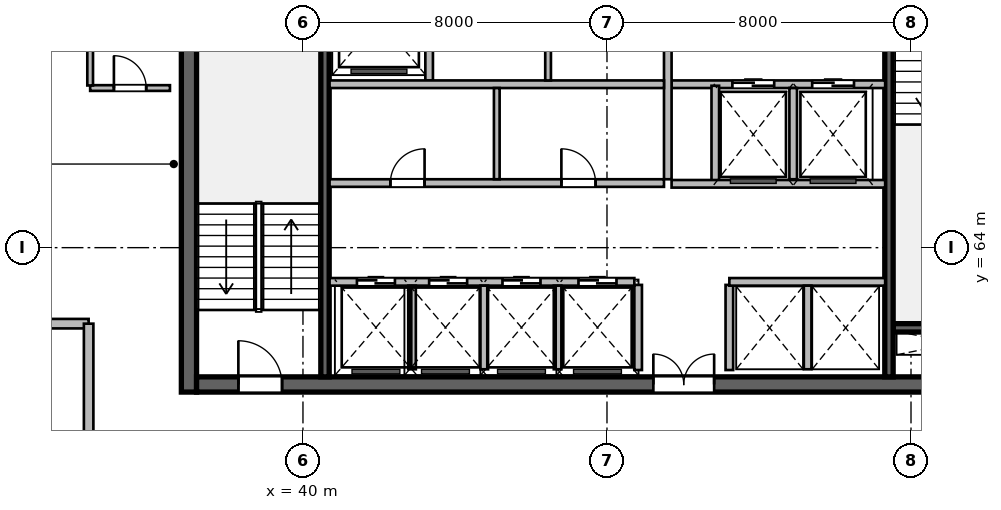
"""IFC4 building model, lengths in metres.
Left out: names, types, materials, properties, quantities, classifications, styles, units other than length and angle.
Written with IfcOpenShell. Run it as: python <this file> out.ifc"""

import sys

from ifc_helpers import new_model, si_unit, direction, frame, frame_2d, origin, place, context, subcontext, project, spatial, rectangle, extrude, source, transform, mapped, element, fill, save


model = new_model("IFC4")
c1 = context("Model", 3, precision=1e-05, world=origin(), true_north=direction((0.0, 1.0)))
c2 = subcontext(c1, "Body", "Model", "MODEL_VIEW")
j1 = project(units=[si_unit("LENGTHUNIT", "METRE"), si_unit("PLANEANGLEUNIT", "RADIAN")], contexts=[c1])
p1 = place(None, origin())
s1 = spatial("IfcSite", under=j1, at=p1, CompositionType="ELEMENT")
p2 = place(p1, origin())
s2 = spatial("IfcBuilding", under=s1, at=p2, CompositionType="ELEMENT")
p3 = place(p2, frame((0.0, 0.0, 264.0)))
s3 = spatial("IfcBuildingStorey", under=s2, at=p3, CompositionType="ELEMENT", Elevation=264.0)
m1 = source(origin(), c2, "Body", "SweptSolid", [
    extrude(rectangle(XDim=12.0, YDim=0.4, at=frame_2d((6.0, 0.0))), origin(), (0.0, 0.0, 1.0), 3.9),
])
p4 = place(p3, frame((37.0, 60.2, 0.0), z_axis=(0.0, 0.0, 1.0), x_axis=(0.0, 1.0, 0.0)))
e1 = element("IfcWall", 1, at=p4, inside=s3, PredefinedType="SHEAR", context=c2, shape_type="MappedRepresentation", body=[
    mapped(m1, transform((0.0, 0.0, 0.0), scale=1.0)),
])
m2 = source(origin(), c2, "Body", "SweptSolid", [
    extrude(rectangle(XDim=21.6, YDim=0.4, at=frame_2d((10.8, 0.0))), origin(), (0.0, 0.0, 1.0), 3.9),
])
p5 = place(p3, frame((37.2, 60.4, 0.0), z_axis=(0.0, 0.0, 1.0), x_axis=(1.0, 0.0, 0.0)))
e2 = element("IfcWall", 2, at=p5, inside=s3, PredefinedType="SHEAR", context=c2, shape_type="MappedRepresentation", body=[
    mapped(m2, transform((0.0, 0.0, 0.0), scale=1.0)),
])
p6 = place(p5, frame((1.1, 0.0, 0.0)))
e3 = element("IfcOpeningElement", 3, at=p6, cuts=e2, PredefinedType="OPENING", context=c2, shape_type="SweptSolid", body=[
    extrude(rectangle(XDim=1.15, YDim=2.15, at=frame_2d((0.575, 1.075))), frame((0.0, 0.21, 0.0), z_axis=(0.0, -1.0, 0.0), x_axis=(1.0, 0.0, 0.0)), (0.0, 0.0, 1.0), 0.42),
])
p7 = place(p5, frame((19.5, 0.0, 0.0)))
e4 = element("IfcOpeningElement", 4, at=p7, cuts=e2, PredefinedType="OPENING", context=c2, shape_type="SweptSolid", body=[
    extrude(rectangle(XDim=0.9, YDim=2.1, at=frame_2d((0.45, 1.05))), frame((0.0, 0.21, 0.0), z_axis=(0.0, -1.0, 0.0), x_axis=(1.0, 0.0, 0.0)), (0.0, 0.0, 1.0), 0.42),
])
p8 = place(p5, frame((12.02, 0.0, 0.0)))
e5 = element("IfcOpeningElement", 5, at=p8, cuts=e2, PredefinedType="OPENING", context=c2, shape_type="SweptSolid", body=[
    extrude(rectangle(XDim=1.6, YDim=2.15, at=frame_2d((0.8, 1.075))), frame((0.0, 0.21, 0.0), z_axis=(0.0, -1.0, 0.0), x_axis=(1.0, 0.0, 0.0)), (0.0, 0.0, 1.0), 0.42),
])
m3 = source(origin(), c2, "Body", "SweptSolid", [
    extrude(rectangle(XDim=3.27, YDim=0.22, at=frame_2d((1.635, 0.0))), origin(), (0.0, 0.0, 1.0), 3.9),
])
p9 = place(p3, frame((55.53, 61.89, 0.0), z_axis=(0.0, 0.0, 1.0), x_axis=(1.0, 0.0, 0.0)))
e6 = element("IfcWall", 6, at=p9, inside=s3, PredefinedType="SHEAR", context=c2, shape_type="MappedRepresentation", body=[
    mapped(m3, transform((0.0, 0.0, 0.0), scale=1.0)),
])
m4 = source(origin(), c2, "Body", "SweptSolid", [
    extrude(rectangle(XDim=11.2, YDim=0.22, at=frame_2d((5.6, 0.0))), origin(), (0.0, 0.0, 1.0), 3.9),
])
p10 = place(p3, frame((40.58, 60.6, 0.0), z_axis=(0.0, 0.0, 1.0), x_axis=(0.0, 1.0, 0.0)))
e7 = element("IfcWall", 7, at=p10, inside=s3, PredefinedType="SHEAR", context=c2, shape_type="MappedRepresentation", body=[
    mapped(m4, transform((0.0, 0.0, 0.0), scale=1.0)),
])
p11 = place(p3, frame((55.42, 60.6, 0.0), z_axis=(0.0, 0.0, 1.0), x_axis=(0.0, 1.0, 0.0)))
e8 = element("IfcWall", 8, at=p11, inside=s3, PredefinedType="SHEAR", context=c2, shape_type="MappedRepresentation", body=[
    mapped(m4, transform((0.0, 0.0, 0.0), scale=1.0)),
])
p12 = place(p11, frame((9.645, 0.0, 0.0)))
e9 = element("IfcOpeningElement", 9, at=p12, cuts=e8, PredefinedType="OPENING", context=c2, shape_type="SweptSolid", body=[
    extrude(rectangle(XDim=1.15, YDim=2.15, at=frame_2d((0.575, 1.075))), frame((0.0, 0.12, 0.0), z_axis=(0.0, -1.0, 0.0), x_axis=(1.0, 0.0, 0.0)), (0.0, 0.0, 1.0), 0.24),
])
m5 = source(origin(), c2, "Body", "SweptSolid", [
    extrude(rectangle(XDim=2.24, YDim=0.2, at=frame_2d((1.12, 0.0))), origin(), (0.0, 0.0, 1.0), 3.65),
])
for number, where, z_axis, x_axis in (
    (10, (48.82, 60.78, 0.0), (0.0, 0.0, 1.0), (0.0, 1.0, 0.0)),
    (11, (51.22, 60.78, 0.0), (0.0, 0.0, 1.0), (0.0, 1.0, 0.0)),
):
    element("IfcWall", number, at=place(p3, frame(where, z_axis=z_axis, x_axis=x_axis)), inside=s3, PredefinedType="SOLIDWALL", context=c2, shape_type="MappedRepresentation", body=[
        mapped(m5, transform((0.0, 0.0, 0.0), scale=1.0)),
    ])
m6 = source(origin(), c2, "Body", "SweptSolid", [
    extrude(rectangle(XDim=5.62, YDim=0.2, at=frame_2d((2.81, 0.0))), origin(), (0.0, 0.0, 1.0), 3.65),
])
p13 = place(p3, frame((49.7, 68.3, 0.0), z_axis=(0.0, 0.0, 1.0), x_axis=(1.0, 0.0, 0.0)))
e12 = element("IfcWall", 12, at=p13, inside=s3, PredefinedType="SOLIDWALL", context=c2, shape_type="MappedRepresentation", body=[
    mapped(m6, transform((0.0, 0.0, 0.0), scale=1.0)),
])
p14 = place(p13, frame((1.6, 0.0, 0.0)))
e13 = element("IfcOpeningElement", 13, at=p14, cuts=e12, PredefinedType="OPENING", context=c2, shape_type="SweptSolid", body=[
    extrude(rectangle(XDim=1.1, YDim=2.15, at=frame_2d((0.55, 1.075))), frame((0.0, 0.11, 0.0), z_axis=(0.0, -1.0, 0.0), x_axis=(1.0, 0.0, 0.0)), (0.0, 0.0, 1.0), 0.22),
])
p15 = place(p13, frame((3.7, 0.0, 0.0)))
e14 = element("IfcOpeningElement", 14, at=p15, cuts=e12, PredefinedType="OPENING", context=c2, shape_type="SweptSolid", body=[
    extrude(rectangle(XDim=1.1, YDim=2.15, at=frame_2d((0.55, 1.075))), frame((0.0, 0.11, 0.0), z_axis=(0.0, -1.0, 0.0), x_axis=(1.0, 0.0, 0.0)), (0.0, 0.0, 1.0), 0.22),
])
m7 = source(origin(), c2, "Body", "SweptSolid", [
    extrude(rectangle(XDim=5.8, YDim=0.2, at=frame_2d((2.9, 0.0))), origin(), (0.0, 0.0, 1.0), 3.65),
])
p16 = place(p3, frame((49.6, 65.8, 0.0), z_axis=(0.0, 0.0, 1.0), x_axis=(0.0, 1.0, 0.0)))
e15 = element("IfcWall", 15, at=p16, inside=s3, PredefinedType="SOLIDWALL", context=c2, shape_type="MappedRepresentation", body=[
    mapped(m7, transform((0.0, 0.0, 0.0), scale=1.0)),
])
m8 = source(origin(), c2, "Body", "SweptSolid", [
    extrude(rectangle(XDim=2.58, YDim=0.2, at=frame_2d((1.29, 0.0))), origin(), (0.0, 0.0, 1.0), 3.65),
])
p17 = place(p3, frame((50.85, 65.68, 0.0), z_axis=(0.0, 0.0, 1.0), x_axis=(0.0, 1.0, 0.0)))
e16 = element("IfcWall", 16, at=p17, inside=s3, PredefinedType="SOLIDWALL", context=c2, shape_type="MappedRepresentation", body=[
    mapped(m8, transform((0.0, 0.0, 0.0), scale=1.0)),
])
m9 = source(origin(), c2, "Body", "SweptSolid", [
    extrude(rectangle(XDim=2.4, YDim=0.2, at=frame_2d((1.2, 0.0))), origin(), (0.0, 0.0, 1.0), 3.65),
])
p18 = place(p3, frame((52.9, 65.8, 0.0), z_axis=(0.0, 0.0, 1.0), x_axis=(0.0, 1.0, 0.0)))
e17 = element("IfcWall", 17, at=p18, inside=s3, PredefinedType="SOLIDWALL", context=c2, shape_type="MappedRepresentation", body=[
    mapped(m9, transform((0.0, 0.0, 0.0), scale=1.0)),
])
p19 = place(p3, frame((49.7, 65.68, 0.0), z_axis=(0.0, 0.0, 1.0), x_axis=(1.0, 0.0, 0.0)))
e18 = element("IfcWall", 18, at=p19, inside=s3, PredefinedType="SOLIDWALL", context=c2, shape_type="MappedRepresentation", body=[
    mapped(m6, transform((0.0, 0.0, 0.0), scale=1.0)),
])
m10 = source(origin(), c2, "Body", "SweptSolid", [
    extrude(rectangle(XDim=3.2, YDim=0.2, at=frame_2d((1.6, 0.0))), origin(), (0.0, 0.0, 1.0), 3.65),
])
p20 = place(p3, frame((43.32, 68.4, 0.0), z_axis=(0.0, 0.0, 1.0), x_axis=(0.0, 1.0, 0.0)))
e19 = element("IfcWall", 19, at=p20, inside=s3, PredefinedType="SOLIDWALL", context=c2, shape_type="MappedRepresentation", body=[
    mapped(m10, transform((0.0, 0.0, 0.0), scale=1.0)),
])
m11 = source(origin(), c2, "Body", "SweptSolid", [
    extrude(rectangle(XDim=8.8, YDim=0.2, at=frame_2d((4.4, 0.0))), origin(), (0.0, 0.0, 1.0), 3.65),
])
p21 = place(p3, frame((40.7, 68.3, 0.0), z_axis=(0.0, 0.0, 1.0), x_axis=(1.0, 0.0, 0.0)))
e20 = element("IfcWall", 20, at=p21, inside=s3, PredefinedType="SOLIDWALL", context=c2, shape_type="MappedRepresentation", body=[
    mapped(m11, transform((0.0, 0.0, 0.0), scale=1.0)),
])
m12 = source(origin(), c2, "Body", "SweptSolid", [
    extrude(rectangle(XDim=3.38, YDim=0.15, at=frame_2d((1.69, 0.0))), origin(), (0.0, 0.0, 1.0), 3.65),
])
p22 = place(p3, frame((46.45, 68.4, 0.0), z_axis=(0.0, 0.0, 1.0), x_axis=(0.0, 1.0, 0.0)))
e21 = element("IfcWall", 21, at=p22, inside=s3, PredefinedType="PARTITIONING", context=c2, shape_type="MappedRepresentation", body=[
    mapped(m12, transform((0.0, 0.0, 0.0), scale=1.0)),
])
m13 = source(origin(), c2, "Body", "SweptSolid", [
    extrude(rectangle(XDim=8.02, YDim=0.2, at=frame_2d((4.01, 0.0))), origin(), (0.0, 0.0, 1.0), 3.65),
])
p23 = place(p3, frame((40.7, 63.1, 0.0), z_axis=(0.0, 0.0, 1.0), x_axis=(1.0, 0.0, 0.0)))
e22 = element("IfcWall", 22, at=p23, inside=s3, PredefinedType="SOLIDWALL", context=c2, shape_type="MappedRepresentation", body=[
    mapped(m13, transform((0.0, 0.0, 0.0), scale=1.0)),
])
p24 = place(p23, frame((0.72, 0.0, 0.0)))
e23 = element("IfcOpeningElement", 23, at=p24, cuts=e22, PredefinedType="OPENING", context=c2, shape_type="SweptSolid", body=[
    extrude(rectangle(XDim=1.0, YDim=2.15, at=frame_2d((0.5, 1.075))), frame((0.0, 0.11, 0.0), z_axis=(0.0, -1.0, 0.0), x_axis=(1.0, 0.0, 0.0)), (0.0, 0.0, 1.0), 0.22),
])
p25 = place(p23, frame((2.62, 0.0, 0.0)))
e24 = element("IfcOpeningElement", 24, at=p25, cuts=e22, PredefinedType="OPENING", context=c2, shape_type="SweptSolid", body=[
    extrude(rectangle(XDim=1.0, YDim=2.15, at=frame_2d((0.5, 1.075))), frame((0.0, 0.11, 0.0), z_axis=(0.0, -1.0, 0.0), x_axis=(1.0, 0.0, 0.0)), (0.0, 0.0, 1.0), 0.22),
])
p26 = place(p23, frame((4.55, 0.0, 0.0)))
e25 = element("IfcOpeningElement", 25, at=p26, cuts=e22, PredefinedType="OPENING", context=c2, shape_type="SweptSolid", body=[
    extrude(rectangle(XDim=1.0, YDim=2.15, at=frame_2d((0.5, 1.075))), frame((0.0, 0.11, 0.0), z_axis=(0.0, -1.0, 0.0), x_axis=(1.0, 0.0, 0.0)), (0.0, 0.0, 1.0), 0.22),
])
p27 = place(p23, frame((6.55, 0.0, 0.0)))
e26 = element("IfcOpeningElement", 26, at=p27, cuts=e22, PredefinedType="OPENING", context=c2, shape_type="SweptSolid", body=[
    extrude(rectangle(XDim=1.0, YDim=2.15, at=frame_2d((0.5, 1.075))), frame((0.0, 0.11, 0.0), z_axis=(0.0, -1.0, 0.0), x_axis=(1.0, 0.0, 0.0)), (0.0, 0.0, 1.0), 0.22),
])
m14 = source(origin(), c2, "Body", "SweptSolid", [
    extrude(rectangle(XDim=4.1, YDim=0.2, at=frame_2d((2.05, 0.0))), origin(), (0.0, 0.0, 1.0), 3.65),
])
p28 = place(p3, frame((51.22, 63.1, 0.0), z_axis=(0.0, 0.0, 1.0), x_axis=(1.0, 0.0, 0.0)))
e27 = element("IfcWall", 27, at=p28, inside=s3, PredefinedType="SOLIDWALL", context=c2, shape_type="MappedRepresentation", body=[
    mapped(m14, transform((0.0, 0.0, 0.0), scale=1.0)),
])
m15 = source(origin(), c2, "Body", "SweptSolid", [
    extrude(rectangle(XDim=2.2, YDim=0.2, at=frame_2d((1.1, 0.0))), origin(), (0.0, 0.0, 1.0), 3.65),
])
for number, where, z_axis, x_axis in (
    (28, (42.87, 60.8, 0.0), (0.0, 0.0, 1.0), (0.0, 1.0, 0.0)),
    (29, (44.77, 60.8, 0.0), (0.0, 0.0, 1.0), (0.0, 1.0, 0.0)),
    (30, (46.7, 60.8, 0.0), (0.0, 0.0, 1.0), (0.0, 1.0, 0.0)),
    (31, (53.28, 60.8, 0.0), (0.0, 0.0, 1.0), (0.0, 1.0, 0.0)),
):
    element("IfcWall", number, at=place(p3, frame(where, z_axis=z_axis, x_axis=x_axis)), inside=s3, PredefinedType="SOLIDWALL", context=c2, shape_type="MappedRepresentation", body=[
        mapped(m15, transform((0.0, 0.0, 0.0), scale=1.0)),
    ])
p29 = place(p3, frame((40.7, 65.7, 0.0), z_axis=(0.0, 0.0, 1.0), x_axis=(1.0, 0.0, 0.0)))
e32 = element("IfcWall", 32, at=p29, inside=s3, PredefinedType="SOLIDWALL", context=c2, shape_type="MappedRepresentation", body=[
    mapped(m11, transform((0.0, 0.0, 0.0), scale=1.0)),
])
p30 = place(p29, frame((1.6, 0.0, 0.0)))
e33 = element("IfcOpeningElement", 33, at=p30, cuts=e32, PredefinedType="OPENING", context=c2, shape_type="SweptSolid", body=[
    extrude(rectangle(XDim=0.9, YDim=2.1, at=frame_2d((0.45, 1.05))), frame((0.0, 0.11, 0.0), z_axis=(0.0, -1.0, 0.0), x_axis=(1.0, 0.0, 0.0)), (0.0, 0.0, 1.0), 0.22),
])
p31 = place(p29, frame((6.1, 0.0, 0.0)))
e34 = element("IfcOpeningElement", 34, at=p31, cuts=e32, PredefinedType="OPENING", context=c2, shape_type="SweptSolid", body=[
    extrude(rectangle(XDim=0.9, YDim=2.1, at=frame_2d((0.45, 1.05))), frame((0.0, 0.11, 0.0), z_axis=(0.0, -1.0, 0.0), x_axis=(1.0, 0.0, 0.0)), (0.0, 0.0, 1.0), 0.22),
])
m16 = source(origin(), c2, "Body", "SweptSolid", [
    extrude(rectangle(XDim=2.4, YDim=0.15, at=frame_2d((1.2, 0.0))), origin(), (0.0, 0.0, 1.0), 3.65),
])
p32 = place(p3, frame((45.1, 65.8, 0.0), z_axis=(0.0, 0.0, 1.0), x_axis=(0.0, 1.0, 0.0)))
e35 = element("IfcWall", 35, at=p32, inside=s3, PredefinedType="PARTITIONING", context=c2, shape_type="MappedRepresentation", body=[
    mapped(m16, transform((0.0, 0.0, 0.0), scale=1.0)),
])
m17 = source(origin(), c2, "Body", "SweptSolid", [
    extrude(rectangle(XDim=2.1, YDim=0.15, at=frame_2d((1.05, 0.0))), origin(), (0.0, 0.0, 1.0), 3.65),
])
p33 = place(p3, frame((34.4, 68.2, 0.0), z_axis=(0.0, 0.0, 1.0), x_axis=(1.0, 0.0, 0.0)))
e36 = element("IfcWall", 36, at=p33, inside=s3, PredefinedType="PARTITIONING", context=c2, shape_type="MappedRepresentation", body=[
    mapped(m17, transform((0.0, 0.0, 0.0), scale=1.0)),
])
p34 = place(p33, frame((0.625, 0.0, 0.0)))
e37 = element("IfcOpeningElement", 37, at=p34, cuts=e36, PredefinedType="OPENING", context=c2, shape_type="SweptSolid", body=[
    extrude(rectangle(XDim=0.85, YDim=2.1, at=frame_2d((0.425, 1.05))), frame((0.0, 0.085, 0.0), z_axis=(0.0, -1.0, 0.0), x_axis=(1.0, 0.0, 0.0)), (0.0, 0.0, 1.0), 0.17),
])
m18 = source(origin(), c2, "Body", "SweptSolid", [
    extrude(rectangle(XDim=3.845, YDim=0.15, at=frame_2d((1.922, 0.0))), origin(), (0.0, 0.0, 1.0), 3.65),
])
p35 = place(p3, frame((34.4, 68.268, 0.0), z_axis=(0.0, 0.0, 1.0), x_axis=(0.0, 1.0, 0.0)))
e38 = element("IfcWall", 38, at=p35, inside=s3, PredefinedType="PARTITIONING", context=c2, shape_type="MappedRepresentation", body=[
    mapped(m18, transform((0.0, 0.0, 0.0), scale=1.0)),
])
m19 = source(origin(), c2, "Body", "SweptSolid", [
    extrude(rectangle(XDim=16.892, YDim=0.25, at=frame_2d((8.446, 0.0))), origin(), (0.0, 0.0, 1.0), 3.65),
])
p36 = place(p3, frame((17.469, 62.0, 0.0), z_axis=(0.0, 0.0, 1.0), x_axis=(1.0, 0.0, 0.0)))
e39 = element("IfcWall", 39, at=p36, inside=s3, PredefinedType="PARTITIONING", context=c2, shape_type="MappedRepresentation", body=[
    mapped(m19, transform((0.0, 0.0, 0.0), scale=1.0)),
])
m20 = source(origin(), c2, "Body", "SweptSolid", [
    extrude(rectangle(XDim=4.04, YDim=0.25, at=frame_2d((2.02, 0.0))), origin(), (0.0, 0.0, 1.0), 3.65),
])
p37 = place(p3, frame((34.36, 57.96, 0.0), z_axis=(0.0, 0.0, 1.0), x_axis=(0.0, 1.0, 0.0)))
e40 = element("IfcWall", 40, at=p37, inside=s3, PredefinedType="PARTITIONING", context=c2, shape_type="MappedRepresentation", body=[
    mapped(m20, transform((0.0, 0.0, 0.0), scale=1.0)),
])
m21 = source(origin(), c2, "Body", "SweptSolid", [
    extrude(rectangle(XDim=1.15, YDim=2.15, at=frame_2d((0.575, 1.075))), frame((0.0, 0.025, 0.0), z_axis=(0.0, -1.0, 0.0), x_axis=(1.0, 0.0, 0.0)), (0.0, 0.0, 1.0), 0.05),
])
p38 = place(p6, origin())
e41 = element("IfcDoor", 41, at=p38, inside=s3, OperationType="SINGLE_SWING_LEFT", PredefinedType="DOOR", context=c2, shape_type="MappedRepresentation", body=[
    mapped(m21, transform((0.0, 0.0, 0.0), scale=1.0)),
])
fill(e3, e41)
m22 = source(origin(), c2, "Body", "SweptSolid", [
    extrude(rectangle(XDim=1.6, YDim=2.15, at=frame_2d((0.8, 1.075))), frame((0.0, 0.025, 0.0), z_axis=(0.0, -1.0, 0.0), x_axis=(1.0, 0.0, 0.0)), (0.0, 0.0, 1.0), 0.05),
])
p39 = place(p8, origin())
e42 = element("IfcDoor", 42, at=p39, inside=s3, OperationType="DOUBLE_DOOR_SINGLE_SWING", PredefinedType="DOOR", context=c2, shape_type="MappedRepresentation", body=[
    mapped(m22, transform((0.0, 0.0, 0.0), scale=1.0)),
])
fill(e5, e42)
m23 = source(origin(), c2, "Body", "SweptSolid", [
    extrude(rectangle(XDim=1.1, YDim=2.15, at=frame_2d((0.55, 1.075))), frame((0.0, 0.025, 0.0), z_axis=(0.0, -1.0, 0.0), x_axis=(1.0, 0.0, 0.0)), (0.0, 0.0, 1.0), 0.05),
])
p40 = place(p14, origin())
e43 = element("IfcDoor", 43, at=p40, inside=s3, OperationType="DOUBLE_DOOR_SLIDING", PredefinedType="DOOR", context=c2, shape_type="MappedRepresentation", body=[
    mapped(m23, transform((0.0, 0.0, 0.0), scale=1.0)),
])
fill(e13, e43)
p41 = place(p15, origin())
e44 = element("IfcDoor", 44, at=p41, inside=s3, OperationType="DOUBLE_DOOR_SLIDING", PredefinedType="DOOR", context=c2, shape_type="MappedRepresentation", body=[
    mapped(m23, transform((0.0, 0.0, 0.0), scale=1.0)),
])
fill(e14, e44)
m24 = source(origin(), c2, "Body", "SweptSolid", [
    extrude(rectangle(XDim=1.0, YDim=2.15, at=frame_2d((0.5, 1.075))), frame((0.0, 0.025, 0.0), z_axis=(0.0, -1.0, 0.0), x_axis=(1.0, 0.0, 0.0)), (0.0, 0.0, 1.0), 0.05),
])
p42 = place(p24, origin())
e45 = element("IfcDoor", 45, at=p42, inside=s3, OperationType="DOUBLE_DOOR_SLIDING", PredefinedType="DOOR", context=c2, shape_type="MappedRepresentation", body=[
    mapped(m24, transform((0.0, 0.0, 0.0), scale=1.0)),
])
fill(e23, e45)
p43 = place(p25, origin())
e46 = element("IfcDoor", 46, at=p43, inside=s3, OperationType="DOUBLE_DOOR_SLIDING", PredefinedType="DOOR", context=c2, shape_type="MappedRepresentation", body=[
    mapped(m24, transform((0.0, 0.0, 0.0), scale=1.0)),
])
fill(e24, e46)
p44 = place(p26, origin())
e47 = element("IfcDoor", 47, at=p44, inside=s3, OperationType="DOUBLE_DOOR_SLIDING", PredefinedType="DOOR", context=c2, shape_type="MappedRepresentation", body=[
    mapped(m24, transform((0.0, 0.0, 0.0), scale=1.0)),
])
fill(e25, e47)
p45 = place(p27, origin())
e48 = element("IfcDoor", 48, at=p45, inside=s3, OperationType="DOUBLE_DOOR_SLIDING", PredefinedType="DOOR", context=c2, shape_type="MappedRepresentation", body=[
    mapped(m24, transform((0.0, 0.0, 0.0), scale=1.0)),
])
fill(e26, e48)
m25 = source(origin(), c2, "Body", "SweptSolid", [
    extrude(rectangle(XDim=0.9, YDim=2.1, at=frame_2d((0.45, 1.05))), frame((0.0, 0.025, 0.0), z_axis=(0.0, -1.0, 0.0), x_axis=(1.0, 0.0, 0.0)), (0.0, 0.0, 1.0), 0.05),
])
p46 = place(p30, origin())
e49 = element("IfcDoor", 49, at=p46, inside=s3, OperationType="SINGLE_SWING_RIGHT", PredefinedType="DOOR", context=c2, shape_type="MappedRepresentation", body=[
    mapped(m25, transform((0.0, 0.0, 0.0), scale=1.0)),
])
fill(e33, e49)
p47 = place(p31, origin())
e50 = element("IfcDoor", 50, at=p47, inside=s3, OperationType="SINGLE_SWING_LEFT", PredefinedType="DOOR", context=c2, shape_type="MappedRepresentation", body=[
    mapped(m25, transform((0.0, 0.0, 0.0), scale=1.0)),
])
fill(e34, e50)
m26 = source(origin(), c2, "Body", "SweptSolid", [
    extrude(rectangle(XDim=0.85, YDim=2.1, at=frame_2d((0.425, 1.05))), frame((0.0, 0.025, 0.0), z_axis=(0.0, -1.0, 0.0), x_axis=(1.0, 0.0, 0.0)), (0.0, 0.0, 1.0), 0.05),
])
p48 = place(p34, origin())
e51 = element("IfcDoor", 51, at=p48, inside=s3, OperationType="SINGLE_SWING_LEFT", PredefinedType="DOOR", context=c2, shape_type="MappedRepresentation", body=[
    mapped(m26, transform((0.0, 0.0, 0.0), scale=1.0)),
])
fill(e37, e51)
save(model, sys.argv[1])
